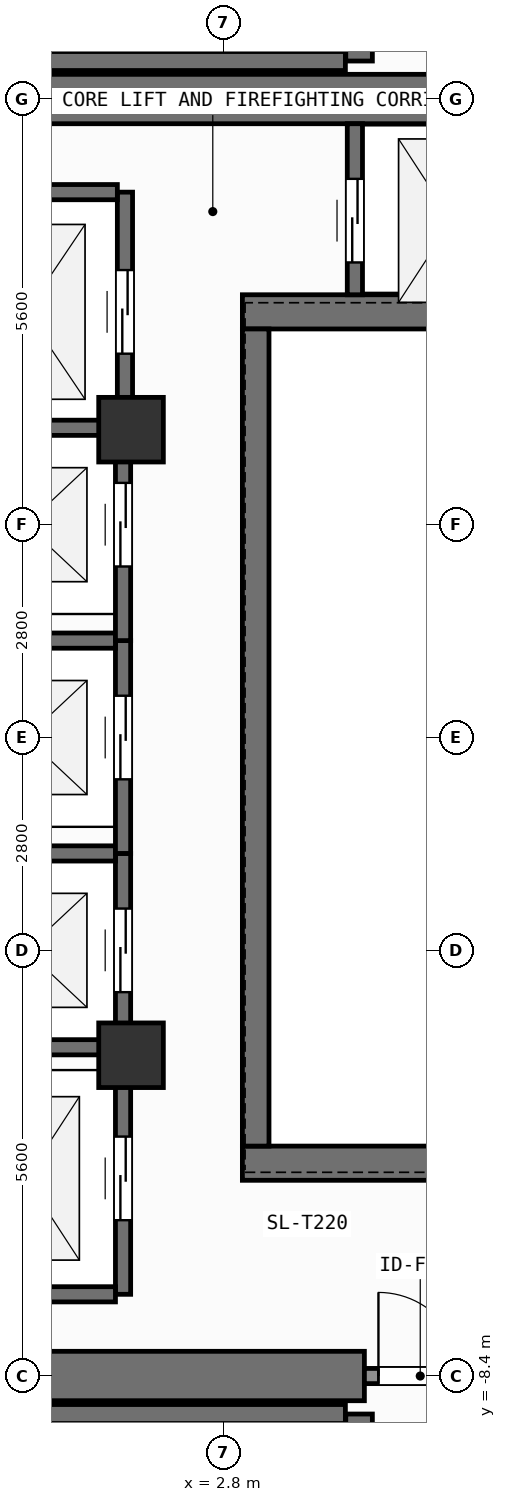
"""IFC4 building model, lengths in metres.
Left out: names, types, materials, properties, quantities, classifications, styles, units other than length and angle.
Written with IfcOpenShell. Run it as: python <this file> out.ifc"""

import sys

from ifc_helpers import new_model, si_unit, direction, frame, frame_2d, origin, origin_2d, place, context, subcontext, project, spatial, rectangle, extrude, element, fill, save


model = new_model("IFC4")
c1 = context("Model", 3, precision=1e-05, world=origin(), true_north=direction((0.0, 1.0)))
c2 = subcontext(c1, "Body", "Model", "MODEL_VIEW")
j1 = project(units=[si_unit("LENGTHUNIT", "METRE"), si_unit("PLANEANGLEUNIT", "RADIAN")], contexts=[c1])
p1 = place(None, origin())
s1 = spatial("IfcSite", under=j1, at=p1, CompositionType="ELEMENT")
p2 = place(p1, origin())
s2 = spatial("IfcBuilding", under=s1, at=p2, CompositionType="ELEMENT")
p3 = place(p2, frame((0.0, 0.0, 243.0)))
s3 = spatial("IfcBuildingStorey", under=s2, at=p3, CompositionType="ELEMENT", Elevation=243.0)
p4 = place(p3, frame((-2.62, -8.4, 0.0), z_axis=(0.0, 0.0, 1.0), x_axis=(1.0, 0.0, 0.0)))
e1 = element("IfcWall", 1, at=p4, inside=s3, PredefinedType="SHEAR", context=c2, shape_type="SweptSolid", body=[
    extrude(rectangle(XDim=7.27, YDim=0.65, at=frame_2d((3.635, 0.0))), origin(), (0.0, 0.0, 1.0), 3.9),
])
p5 = place(p3, frame((-7.55, 8.4, 0.0), z_axis=(0.0, 0.0, 1.0), x_axis=(1.0, 0.0, 0.0)))
e2 = element("IfcWall", 2, at=p5, inside=s3, PredefinedType="SHEAR", context=c2, shape_type="SweptSolid", body=[
    extrude(rectangle(XDim=16.275, YDim=0.65, at=frame_2d((8.138, 0.0))), origin(), (0.0, 0.0, 1.0), 3.9),
])
for number, where, z_axis, x_axis in (
    (3, (3.045, -5.6, 0.0), (0.0, 0.0, 1.0), (1.0, 0.0, 0.0)),
    (4, (3.045, 5.6, 0.0), (0.0, 0.0, 1.0), (1.0, 0.0, 0.0)),
):
    element("IfcWall", number, at=place(p3, frame(where, z_axis=z_axis, x_axis=x_axis)), inside=s3, PredefinedType="SHEAR", context=c2, shape_type="SweptSolid", body=[
        extrude(rectangle(XDim=5.68, YDim=0.45, at=frame_2d((2.84, 0.0))), origin(), (0.0, 0.0, 1.0), 3.9),
    ])
p6 = place(p3, frame((3.22, -5.375, 0.0), z_axis=(0.0, 0.0, 1.0), x_axis=(0.0, 1.0, 0.0)))
e5 = element("IfcWall", 5, at=p6, inside=s3, PredefinedType="SHEAR", context=c2, shape_type="SweptSolid", body=[
    extrude(rectangle(XDim=10.75, YDim=0.35, at=frame_2d((5.375, 0.0))), origin(), (0.0, 0.0, 1.0), 3.9),
])
p7 = place(p3, frame((-2.2, -8.9, 0.0), z_axis=(0.0, 0.0, 1.0), x_axis=(1.0, 0.0, 0.0)))
e6 = element("IfcWall", 6, at=p7, inside=s3, PredefinedType="SHEAR", context=c2, shape_type="SweptSolid", body=[
    extrude(rectangle(XDim=6.6, YDim=0.25, at=frame_2d((3.3, 0.0))), origin(), (0.0, 0.0, 1.0), 3.9),
])
p8 = place(p3, frame((4.58, -8.9, 0.0), z_axis=(0.0, 0.0, 1.0), x_axis=(0.0, -1.0, 0.0)))
e7 = element("IfcWall", 7, at=p8, inside=s3, PredefinedType="SHEAR", context=c2, shape_type="SweptSolid", body=[
    extrude(rectangle(XDim=2.925, YDim=0.35, at=frame_2d((1.462, 0.0))), origin(), (0.0, 0.0, 1.0), 3.9),
])
p9 = place(p8, frame((0.913, 0.0, 0.0)))
e8 = element("IfcOpeningElement", 8, at=p9, cuts=e7, PredefinedType="OPENING", context=c2, shape_type="SweptSolid", body=[
    extrude(rectangle(XDim=1.1, YDim=2.15, at=frame_2d((0.55, 1.075))), frame((0.0, 0.185, 0.0), z_axis=(0.0, -1.0, 0.0), x_axis=(1.0, 0.0, 0.0)), (0.0, 0.0, 1.0), 0.37),
])
p10 = place(p3, frame((-2.2, 8.9, 0.0), z_axis=(0.0, 0.0, 1.0), x_axis=(1.0, 0.0, 0.0)))
e9 = element("IfcWall", 9, at=p10, inside=s3, PredefinedType="SHEAR", context=c2, shape_type="SweptSolid", body=[
    extrude(rectangle(XDim=6.6, YDim=0.25, at=frame_2d((3.3, 0.0))), origin(), (0.0, 0.0, 1.0), 3.9),
])
p11 = place(p3, frame((4.58, 11.825, 0.0), z_axis=(0.0, 0.0, 1.0), x_axis=(0.0, -1.0, 0.0)))
e10 = element("IfcWall", 10, at=p11, inside=s3, PredefinedType="SHEAR", context=c2, shape_type="SweptSolid", body=[
    extrude(rectangle(XDim=2.925, YDim=0.35, at=frame_2d((1.462, 0.0))), origin(), (0.0, 0.0, 1.0), 3.9),
])
p12 = place(p11, frame((0.913, 0.0, 0.0)))
e11 = element("IfcOpeningElement", 11, at=p12, cuts=e10, PredefinedType="OPENING", context=c2, shape_type="SweptSolid", body=[
    extrude(rectangle(XDim=1.1, YDim=2.15, at=frame_2d((0.55, 1.075))), frame((0.0, 0.185, 0.0), z_axis=(0.0, -1.0, 0.0), x_axis=(1.0, 0.0, 0.0)), (0.0, 0.0, 1.0), 0.37),
])
for number, where, z_axis, x_axis in (
    (12, (1.58, -4.18, 0.0), (0.0, 0.0, 1.0), (1.0, 0.0, 0.0)),
    (13, (1.58, 4.05, 0.0), (0.0, 0.0, 1.0), (1.0, 0.0, 0.0)),
):
    element("IfcColumn", number, at=place(p3, frame(where, z_axis=z_axis, x_axis=x_axis)), inside=s3, PredefinedType="COLUMN", context=c2, shape_type="SweptSolid", body=[
        extrude(rectangle(XDim=0.85, YDim=0.85, at=origin_2d()), origin(), (0.0, 0.0, 1.0), 3.9),
    ])
p13 = place(p3, frame((1.475, -4.275, 0.0), z_axis=(0.0, 0.0, 1.0), x_axis=(0.0, 1.0, 0.0)))
e14 = element("IfcWall", 14, at=p13, inside=s3, PredefinedType="SHEAR", context=c2, shape_type="SweptSolid", body=[
    extrude(rectangle(XDim=2.75, YDim=0.2, at=frame_2d((1.375, 0.0))), origin(), (0.0, 0.0, 1.0), 3.68),
])
p14 = place(p13, frame((0.925, 0.0, 0.0)))
e15 = element("IfcOpeningElement", 15, at=p14, cuts=e14, PredefinedType="OPENING", context=c2, shape_type="SweptSolid", body=[
    extrude(rectangle(XDim=1.1, YDim=2.2, at=frame_2d((0.55, 1.1))), frame((0.0, 0.11, 0.0), z_axis=(0.0, -1.0, 0.0), x_axis=(1.0, 0.0, 0.0)), (0.0, 0.0, 1.0), 0.22),
])
for number, where, z_axis, x_axis in (
    (16, (-0.975, -4.075, 0.0), (0.0, 0.0, 1.0), (1.0, 0.0, 0.0)),
    (17, (-0.975, -1.525, 0.0), (0.0, 0.0, 1.0), (1.0, 0.0, 0.0)),
):
    element("IfcWall", number, at=place(p3, frame(where, z_axis=z_axis, x_axis=x_axis)), inside=s3, PredefinedType="SHEAR", context=c2, shape_type="SweptSolid", body=[
        extrude(rectangle(XDim=2.35, YDim=0.2, at=frame_2d((1.175, 0.0))), origin(), (0.0, 0.0, 1.0), 3.68),
    ])
p15 = place(p3, frame((1.475, -1.525, 0.0), z_axis=(0.0, 0.0, 1.0), x_axis=(0.0, 1.0, 0.0)))
e18 = element("IfcWall", 18, at=p15, inside=s3, PredefinedType="SHEAR", context=c2, shape_type="SweptSolid", body=[
    extrude(rectangle(XDim=2.8, YDim=0.2, at=frame_2d((1.4, 0.0))), origin(), (0.0, 0.0, 1.0), 3.68),
])
p16 = place(p15, frame((0.975, 0.0, 0.0)))
e19 = element("IfcOpeningElement", 19, at=p16, cuts=e18, PredefinedType="OPENING", context=c2, shape_type="SweptSolid", body=[
    extrude(rectangle(XDim=1.1, YDim=2.2, at=frame_2d((0.55, 1.1))), frame((0.0, 0.11, 0.0), z_axis=(0.0, -1.0, 0.0), x_axis=(1.0, 0.0, 0.0)), (0.0, 0.0, 1.0), 0.22),
])
p17 = place(p3, frame((-0.975, 1.275, 0.0), z_axis=(0.0, 0.0, 1.0), x_axis=(1.0, 0.0, 0.0)))
e20 = element("IfcWall", 20, at=p17, inside=s3, PredefinedType="SHEAR", context=c2, shape_type="SweptSolid", body=[
    extrude(rectangle(XDim=2.35, YDim=0.2, at=frame_2d((1.175, 0.0))), origin(), (0.0, 0.0, 1.0), 3.68),
])
p18 = place(p3, frame((1.475, 1.275, 0.0), z_axis=(0.0, 0.0, 1.0), x_axis=(0.0, 1.0, 0.0)))
e21 = element("IfcWall", 21, at=p18, inside=s3, PredefinedType="SHEAR", context=c2, shape_type="SweptSolid", body=[
    extrude(rectangle(XDim=2.8, YDim=0.2, at=frame_2d((1.4, 0.0))), origin(), (0.0, 0.0, 1.0), 3.68),
])
p19 = place(p18, frame((0.975, 0.0, 0.0)))
e22 = element("IfcOpeningElement", 22, at=p19, cuts=e21, PredefinedType="OPENING", context=c2, shape_type="SweptSolid", body=[
    extrude(rectangle(XDim=1.1, YDim=2.2, at=frame_2d((0.55, 1.1))), frame((0.0, 0.11, 0.0), z_axis=(0.0, -1.0, 0.0), x_axis=(1.0, 0.0, 0.0)), (0.0, 0.0, 1.0), 0.22),
])
p20 = place(p3, frame((-0.975, 4.075, 0.0), z_axis=(0.0, 0.0, 1.0), x_axis=(1.0, 0.0, 0.0)))
e23 = element("IfcWall", 23, at=p20, inside=s3, PredefinedType="SHEAR", context=c2, shape_type="SweptSolid", body=[
    extrude(rectangle(XDim=2.35, YDim=0.2, at=frame_2d((1.175, 0.0))), origin(), (0.0, 0.0, 1.0), 3.68),
])
p21 = place(p3, frame((1.5, 4.025, 0.0), z_axis=(0.0, 0.0, 1.0), x_axis=(0.0, 1.0, 0.0)))
e24 = element("IfcWall", 24, at=p21, inside=s3, PredefinedType="SHEAR", context=c2, shape_type="SweptSolid", body=[
    extrude(rectangle(XDim=3.15, YDim=0.2, at=frame_2d((1.575, 0.0))), origin(), (0.0, 0.0, 1.0), 3.68),
])
p22 = place(p21, frame((1.025, 0.0, 0.0)))
e25 = element("IfcOpeningElement", 25, at=p22, cuts=e24, PredefinedType="OPENING", context=c2, shape_type="SweptSolid", body=[
    extrude(rectangle(XDim=1.1, YDim=2.2, at=frame_2d((0.55, 1.1))), frame((0.0, 0.11, 0.0), z_axis=(0.0, -1.0, 0.0), x_axis=(1.0, 0.0, 0.0)), (0.0, 0.0, 1.0), 0.22),
])
p23 = place(p3, frame((-1.0, 7.175, 0.0), z_axis=(0.0, 0.0, 1.0), x_axis=(1.0, 0.0, 0.0)))
e26 = element("IfcWall", 26, at=p23, inside=s3, PredefinedType="SHEAR", context=c2, shape_type="SweptSolid", body=[
    extrude(rectangle(XDim=2.4, YDim=0.2, at=frame_2d((1.2, 0.0))), origin(), (0.0, 0.0, 1.0), 3.68),
])
p24 = place(p3, frame((1.475, -7.325, 0.0), z_axis=(0.0, 0.0, 1.0), x_axis=(0.0, 1.0, 0.0)))
e27 = element("IfcWall", 27, at=p24, inside=s3, PredefinedType="SHEAR", context=c2, shape_type="SweptSolid", body=[
    extrude(rectangle(XDim=3.05, YDim=0.2, at=frame_2d((1.525, 0.0))), origin(), (0.0, 0.0, 1.0), 3.68),
])
p25 = place(p24, frame((0.975, 0.0, 0.0)))
e28 = element("IfcOpeningElement", 28, at=p25, cuts=e27, PredefinedType="OPENING", context=c2, shape_type="SweptSolid", body=[
    extrude(rectangle(XDim=1.1, YDim=2.2, at=frame_2d((0.55, 1.1))), frame((0.0, 0.11, 0.0), z_axis=(0.0, -1.0, 0.0), x_axis=(1.0, 0.0, 0.0)), (0.0, 0.0, 1.0), 0.22),
])
p26 = place(p3, frame((-0.975, -7.325, 0.0), z_axis=(0.0, 0.0, 1.0), x_axis=(1.0, 0.0, 0.0)))
e29 = element("IfcWall", 29, at=p26, inside=s3, PredefinedType="SHEAR", context=c2, shape_type="SweptSolid", body=[
    extrude(rectangle(XDim=2.35, YDim=0.2, at=frame_2d((1.175, 0.0))), origin(), (0.0, 0.0, 1.0), 3.68),
])
p27 = place(p3, frame((4.525, 5.825, 0.0), z_axis=(0.0, 0.0, 1.0), x_axis=(0.0, 1.0, 0.0)))
e30 = element("IfcWall", 30, at=p27, inside=s3, PredefinedType="SHEAR", context=c2, shape_type="SweptSolid", body=[
    extrude(rectangle(XDim=2.25, YDim=0.2, at=frame_2d((1.125, 0.0))), origin(), (0.0, 0.0, 1.0), 3.68),
])
p28 = place(p27, frame((0.425, 0.0, 0.0)))
e31 = element("IfcOpeningElement", 31, at=p28, cuts=e30, PredefinedType="OPENING", context=c2, shape_type="SweptSolid", body=[
    extrude(rectangle(XDim=1.1, YDim=2.2, at=frame_2d((0.55, 1.1))), frame((0.0, 0.11, 0.0), z_axis=(0.0, -1.0, 0.0), x_axis=(1.0, 0.0, 0.0)), (0.0, 0.0, 1.0), 0.22),
])
p29 = place(p3, frame((4.65, -8.4, 0.0), z_axis=(0.0, 0.0, 1.0), x_axis=(1.0, 0.0, 0.0)))
e32 = element("IfcWall", 32, at=p29, inside=s3, PredefinedType="SOLIDWALL", context=c2, shape_type="SweptSolid", body=[
    extrude(rectangle(XDim=1.47, YDim=0.2, at=frame_2d((0.735, 0.0))), origin(), (0.0, 0.0, 1.0), 2.92),
])
p30 = place(p29, frame((0.185, 0.0, 0.0)))
e33 = element("IfcOpeningElement", 33, at=p30, cuts=e32, PredefinedType="OPENING", context=c2, shape_type="SweptSolid", body=[
    extrude(rectangle(XDim=1.1, YDim=2.15, at=frame_2d((0.55, 1.075))), frame((0.0, 0.11, 0.0), z_axis=(0.0, -1.0, 0.0), x_axis=(1.0, 0.0, 0.0)), (0.0, 0.0, 1.0), 0.22),
])
p31 = place(p14, origin())
e34 = element("IfcDoor", 34, at=p31, inside=s3, OperationType="SLIDING_TO_LEFT", PredefinedType="DOOR", context=c2, shape_type="SweptSolid", body=[
    extrude(rectangle(XDim=1.1, YDim=2.2, at=frame_2d((0.55, 1.1))), frame((0.0, 0.025, 0.0), z_axis=(0.0, -1.0, 0.0), x_axis=(1.0, 0.0, 0.0)), (0.0, 0.0, 1.0), 0.05),
])
fill(e15, e34)
p32 = place(p16, origin())
e35 = element("IfcDoor", 35, at=p32, inside=s3, OperationType="SLIDING_TO_LEFT", PredefinedType="DOOR", context=c2, shape_type="SweptSolid", body=[
    extrude(rectangle(XDim=1.1, YDim=2.2, at=frame_2d((0.55, 1.1))), frame((0.0, 0.025, 0.0), z_axis=(0.0, -1.0, 0.0), x_axis=(1.0, 0.0, 0.0)), (0.0, 0.0, 1.0), 0.05),
])
fill(e19, e35)
p33 = place(p19, origin())
e36 = element("IfcDoor", 36, at=p33, inside=s3, OperationType="SLIDING_TO_LEFT", PredefinedType="DOOR", context=c2, shape_type="SweptSolid", body=[
    extrude(rectangle(XDim=1.1, YDim=2.2, at=frame_2d((0.55, 1.1))), frame((0.0, 0.025, 0.0), z_axis=(0.0, -1.0, 0.0), x_axis=(1.0, 0.0, 0.0)), (0.0, 0.0, 1.0), 0.05),
])
fill(e22, e36)
p34 = place(p22, origin())
e37 = element("IfcDoor", 37, at=p34, inside=s3, OperationType="SLIDING_TO_LEFT", PredefinedType="DOOR", context=c2, shape_type="SweptSolid", body=[
    extrude(rectangle(XDim=1.1, YDim=2.2, at=frame_2d((0.55, 1.1))), frame((0.0, 0.025, 0.0), z_axis=(0.0, -1.0, 0.0), x_axis=(1.0, 0.0, 0.0)), (0.0, 0.0, 1.0), 0.05),
])
fill(e25, e37)
p35 = place(p25, origin())
e38 = element("IfcDoor", 38, at=p35, inside=s3, OperationType="SLIDING_TO_LEFT", PredefinedType="DOOR", context=c2, shape_type="SweptSolid", body=[
    extrude(rectangle(XDim=1.1, YDim=2.2, at=frame_2d((0.55, 1.1))), frame((0.0, 0.025, 0.0), z_axis=(0.0, -1.0, 0.0), x_axis=(1.0, 0.0, 0.0)), (0.0, 0.0, 1.0), 0.05),
])
fill(e28, e38)
p36 = place(p28, origin())
e39 = element("IfcDoor", 39, at=p36, inside=s3, OperationType="SLIDING_TO_LEFT", PredefinedType="DOOR", context=c2, shape_type="SweptSolid", body=[
    extrude(rectangle(XDim=1.1, YDim=2.2, at=frame_2d((0.55, 1.1))), frame((0.0, 0.025, 0.0), z_axis=(0.0, -1.0, 0.0), x_axis=(1.0, 0.0, 0.0)), (0.0, 0.0, 1.0), 0.05),
])
fill(e31, e39)
p37 = place(p30, origin())
e40 = element("IfcDoor", 40, at=p37, inside=s3, OperationType="SINGLE_SWING_LEFT", PredefinedType="DOOR", context=c2, shape_type="SweptSolid", body=[
    extrude(rectangle(XDim=1.1, YDim=2.15, at=frame_2d((0.55, 1.075))), frame((0.0, 0.025, 0.0), z_axis=(0.0, -1.0, 0.0), x_axis=(1.0, 0.0, 0.0)), (0.0, 0.0, 1.0), 0.05),
])
fill(e33, e40)
save(model, sys.argv[1])
